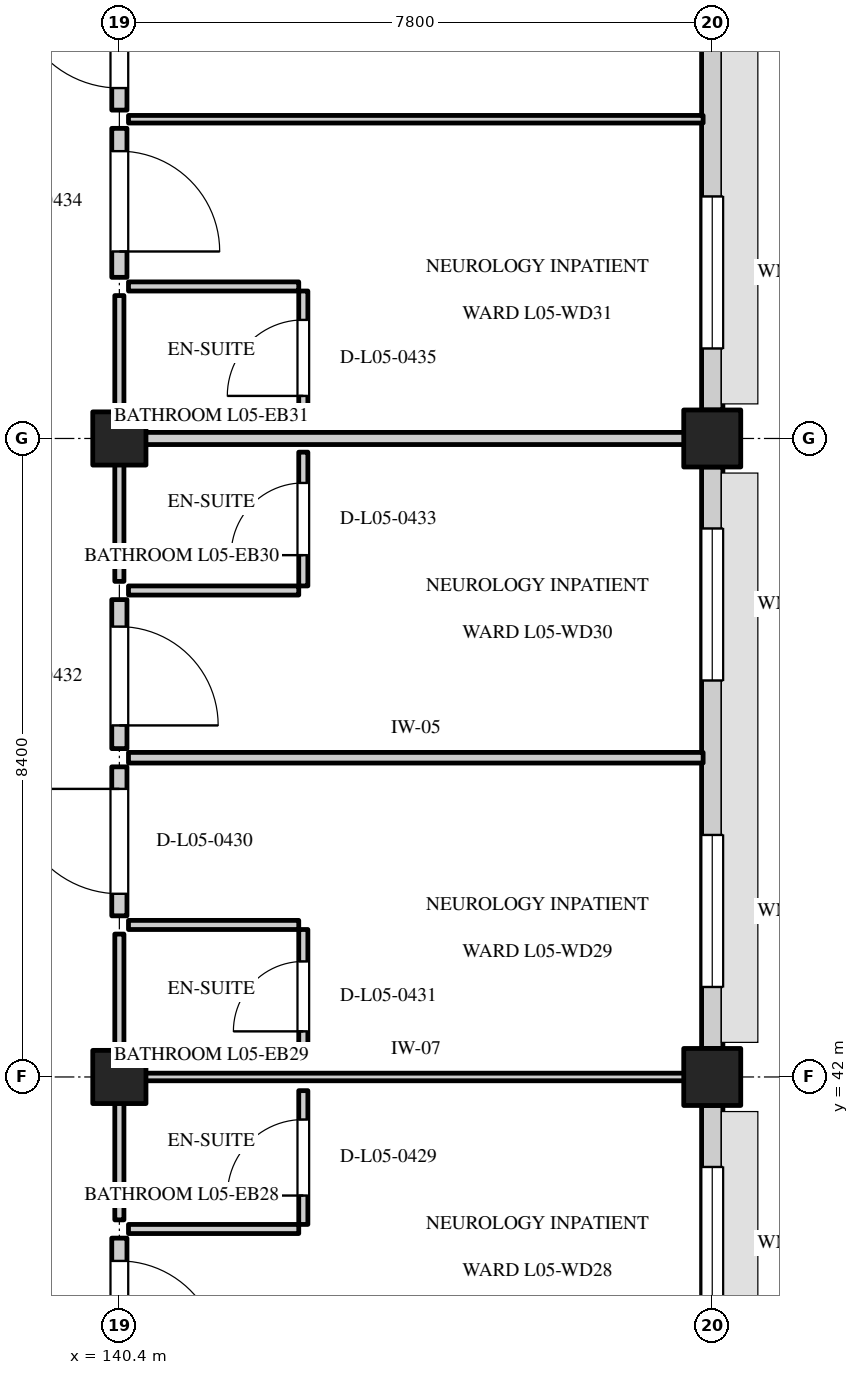
"""IFC4 building model, lengths in metres.
Left out: names, types, materials, properties, quantities, classifications, styles, units other than length and angle.
Written with IfcOpenShell. Run it as: python <this file> out.ifc"""

import sys

from ifc_helpers import new_model, si_unit, direction, frame, frame_2d, origin, origin_2d, place, context, subcontext, project, spatial, rectangle, extrude, element, fill, save


model = new_model("IFC4")
c1 = context("Model", 3, precision=1e-05, world=origin(), true_north=direction((0.0, 1.0)))
c2 = subcontext(c1, "Body", "Model", "MODEL_VIEW")
j1 = project(units=[si_unit("LENGTHUNIT", "METRE"), si_unit("PLANEANGLEUNIT", "RADIAN")], contexts=[c1])
p1 = place(None, origin())
s1 = spatial("IfcSite", under=j1, at=p1, CompositionType="ELEMENT")
p2 = place(p1, origin())
s2 = spatial("IfcBuilding", under=s1, at=p2, CompositionType="ELEMENT")
p3 = place(p2, frame((0.0, 0.0, 22.2)))
s3 = spatial("IfcBuildingStorey", under=s2, at=p3, CompositionType="ELEMENT", Elevation=22.2)
for number, where, z_axis, x_axis in (
    (1, (140.4, 42.0, 0.0), (0.0, 0.0, 1.0), (1.0, 0.0, 0.0)),
    (2, (140.4, 50.4, 0.0), (0.0, 0.0, 1.0), (1.0, 0.0, 0.0)),
):
    element("IfcColumn", number, at=place(p3, frame(where, z_axis=z_axis, x_axis=x_axis)), inside=s3, PredefinedType="COLUMN", context=c2, shape_type="SweptSolid", body=[
        extrude(rectangle(XDim=0.7, YDim=0.7, at=origin_2d()), origin(), (0.0, 0.0, 1.0), 3.9),
    ])
for number, where, z_axis, x_axis in (
    (3, (148.2, 42.0, 0.0), (0.0, 0.0, 1.0), (1.0, 0.0, 0.0)),
    (4, (148.2, 50.4, 0.0), (0.0, 0.0, 1.0), (1.0, 0.0, 0.0)),
):
    element("IfcColumn", number, at=place(p3, frame(where, z_axis=z_axis, x_axis=x_axis)), inside=s3, PredefinedType="COLUMN", context=c2, shape_type="SweptSolid", body=[
        extrude(rectangle(XDim=0.75, YDim=0.75, at=origin_2d()), origin(), (0.0, 0.0, 1.0), 3.9),
    ])
p4 = place(p3, frame((148.2, 33.975, 0.0), z_axis=(0.0, 0.0, 1.0), x_axis=(0.0, 1.0, 0.0)))
e5 = element("IfcWall", 5, at=p4, inside=s3, PredefinedType="STANDARD", context=c2, shape_type="SweptSolid", body=[
    extrude(rectangle(XDim=7.65, YDim=0.28, at=frame_2d((3.825, 0.0))), origin(), (0.0, 0.0, 1.0), 2.95),
])
p5 = place(p4, frame((0.809, 0.0, 0.8)))
e6 = element("IfcOpeningElement", 6, at=p5, cuts=e5, PredefinedType="OPENING", context=c2, shape_type="SweptSolid", body=[
    extrude(rectangle(XDim=2.0, YDim=1.65, at=frame_2d((1.0, 0.825))), frame((0.0, 0.152, 0.0), z_axis=(0.0, -1.0, 0.0), x_axis=(1.0, 0.0, 0.0)), (0.0, 0.0, 1.0), 0.304),
])
p6 = place(p4, frame((4.841, 0.0, 0.8)))
e7 = element("IfcOpeningElement", 7, at=p6, cuts=e5, PredefinedType="OPENING", context=c2, shape_type="SweptSolid", body=[
    extrude(rectangle(XDim=2.0, YDim=1.65, at=frame_2d((1.0, 0.825))), frame((0.0, 0.152, 0.0), z_axis=(0.0, -1.0, 0.0), x_axis=(1.0, 0.0, 0.0)), (0.0, 0.0, 1.0), 0.304),
])
p7 = place(p3, frame((148.2, 42.375, 0.0), z_axis=(0.0, 0.0, 1.0), x_axis=(0.0, 1.0, 0.0)))
e8 = element("IfcWall", 8, at=p7, inside=s3, PredefinedType="STANDARD", context=c2, shape_type="SweptSolid", body=[
    extrude(rectangle(XDim=7.65, YDim=0.28, at=frame_2d((3.825, 0.0))), origin(), (0.0, 0.0, 1.0), 2.95),
])
p8 = place(p7, frame((0.809, 0.0, 0.8)))
e9 = element("IfcOpeningElement", 9, at=p8, cuts=e8, PredefinedType="OPENING", context=c2, shape_type="SweptSolid", body=[
    extrude(rectangle(XDim=2.0, YDim=1.55, at=frame_2d((1.0, 0.775))), frame((0.0, 0.152, 0.0), z_axis=(0.0, -1.0, 0.0), x_axis=(1.0, 0.0, 0.0)), (0.0, 0.0, 1.0), 0.304),
])
p9 = place(p7, frame((4.841, 0.0, 0.8)))
e10 = element("IfcOpeningElement", 10, at=p9, cuts=e8, PredefinedType="OPENING", context=c2, shape_type="SweptSolid", body=[
    extrude(rectangle(XDim=2.0, YDim=1.55, at=frame_2d((1.0, 0.775))), frame((0.0, 0.152, 0.0), z_axis=(0.0, -1.0, 0.0), x_axis=(1.0, 0.0, 0.0)), (0.0, 0.0, 1.0), 0.304),
])
p10 = place(p3, frame((148.2, 50.775, 0.0), z_axis=(0.0, 0.0, 1.0), x_axis=(0.0, 1.0, 0.0)))
e11 = element("IfcWall", 11, at=p10, inside=s3, PredefinedType="STANDARD", context=c2, shape_type="SweptSolid", body=[
    extrude(rectangle(XDim=7.65, YDim=0.28, at=frame_2d((3.825, 0.0))), origin(), (0.0, 0.0, 1.0), 2.95),
])
p11 = place(p10, frame((0.809, 0.0, 0.8)))
e12 = element("IfcOpeningElement", 12, at=p11, cuts=e11, PredefinedType="OPENING", context=c2, shape_type="SweptSolid", body=[
    extrude(rectangle(XDim=2.0, YDim=1.45, at=frame_2d((1.0, 0.725))), frame((0.0, 0.152, 0.0), z_axis=(0.0, -1.0, 0.0), x_axis=(1.0, 0.0, 0.0)), (0.0, 0.0, 1.0), 0.304),
])
p12 = place(p10, frame((4.841, 0.0, 0.8)))
e13 = element("IfcOpeningElement", 13, at=p12, cuts=e11, PredefinedType="OPENING", context=c2, shape_type="SweptSolid", body=[
    extrude(rectangle(XDim=2.0, YDim=1.45, at=frame_2d((1.0, 0.725))), frame((0.0, 0.152, 0.0), z_axis=(0.0, -1.0, 0.0), x_axis=(1.0, 0.0, 0.0)), (0.0, 0.0, 1.0), 0.304),
])
p13 = place(p3, frame((140.52, 42.0, 0.0), z_axis=(0.0, 0.0, 1.0), x_axis=(1.0, 0.0, 0.0)))
e14 = element("IfcWall", 14, at=p13, inside=s3, PredefinedType="PARTITIONING", context=c2, shape_type="SweptSolid", body=[
    extrude(rectangle(XDim=7.56, YDim=0.1, at=frame_2d((3.78, 0.0))), origin(), (0.0, 0.0, 1.0), 3.58),
])
p14 = place(p3, frame((140.4, 37.92, 0.0), z_axis=(0.0, 0.0, 1.0), x_axis=(0.0, 1.0, 0.0)))
e15 = element("IfcWall", 15, at=p14, inside=s3, PredefinedType="STANDARD", context=c2, shape_type="SweptSolid", body=[
    extrude(rectangle(XDim=1.96, YDim=0.2, at=frame_2d((0.98, 0.0))), origin(), (0.0, 0.0, 1.0), 3.58),
])
p15 = place(p14, frame((0.34, 0.0, 0.0)))
e16 = element("IfcOpeningElement", 16, at=p15, cuts=e15, PredefinedType="OPENING", context=c2, shape_type="SweptSolid", body=[
    extrude(rectangle(XDim=1.32, YDim=2.2, at=frame_2d((0.66, 1.1))), frame((0.0, 0.112, 0.0), z_axis=(0.0, -1.0, 0.0), x_axis=(1.0, 0.0, 0.0)), (0.0, 0.0, 1.0), 0.224),
])
p16 = place(p3, frame((140.4, 40.12, 0.0), z_axis=(0.0, 0.0, 1.0), x_axis=(0.0, 1.0, 0.0)))
e17 = element("IfcWall", 17, at=p16, inside=s3, PredefinedType="PARTITIONING", context=c2, shape_type="SweptSolid", body=[
    extrude(rectangle(XDim=1.76, YDim=0.12, at=frame_2d((0.88, 0.0))), origin(), (0.0, 0.0, 1.0), 3.58),
])
p17 = place(p3, frame((140.52, 40.0, 0.0), z_axis=(0.0, 0.0, 1.0), x_axis=(1.0, 0.0, 0.0)))
e18 = element("IfcWall", 18, at=p17, inside=s3, PredefinedType="PARTITIONING", context=c2, shape_type="SweptSolid", body=[
    extrude(rectangle(XDim=2.24, YDim=0.12, at=frame_2d((1.12, 0.0))), origin(), (0.0, 0.0, 1.0), 3.58),
])
p18 = place(p3, frame((142.82, 40.06, 0.0), z_axis=(0.0, 0.0, 1.0), x_axis=(0.0, 1.0, 0.0)))
e19 = element("IfcWall", 19, at=p18, inside=s3, PredefinedType="PARTITIONING", context=c2, shape_type="SweptSolid", body=[
    extrude(rectangle(XDim=1.76, YDim=0.12, at=frame_2d((0.88, 0.0))), origin(), (0.0, 0.0, 1.0), 3.58),
])
p19 = place(p18, frame((0.38, 0.0, 0.0)))
e20 = element("IfcOpeningElement", 20, at=p19, cuts=e19, PredefinedType="OPENING", context=c2, shape_type="SweptSolid", body=[
    extrude(rectangle(XDim=1.0, YDim=2.1, at=frame_2d((0.5, 1.05))), frame((0.0, 0.072, 0.0), z_axis=(0.0, -1.0, 0.0), x_axis=(1.0, 0.0, 0.0)), (0.0, 0.0, 1.0), 0.144),
])
p20 = place(p3, frame((140.52, 46.2, 0.0), z_axis=(0.0, 0.0, 1.0), x_axis=(1.0, 0.0, 0.0)))
e21 = element("IfcWall", 21, at=p20, inside=s3, PredefinedType="PARTITIONING", context=c2, shape_type="SweptSolid", body=[
    extrude(rectangle(XDim=7.56, YDim=0.14, at=frame_2d((3.78, 0.0))), origin(), (0.0, 0.0, 1.0), 3.58),
])
p21 = place(p3, frame((140.4, 44.12, 0.0), z_axis=(0.0, 0.0, 1.0), x_axis=(0.0, 1.0, 0.0)))
e22 = element("IfcWall", 22, at=p21, inside=s3, PredefinedType="STANDARD", context=c2, shape_type="SweptSolid", body=[
    extrude(rectangle(XDim=1.96, YDim=0.2, at=frame_2d((0.98, 0.0))), origin(), (0.0, 0.0, 1.0), 3.58),
])
p22 = place(p21, frame((0.29, 0.0, 0.0)))
e23 = element("IfcOpeningElement", 23, at=p22, cuts=e22, PredefinedType="OPENING", context=c2, shape_type="SweptSolid", body=[
    extrude(rectangle(XDim=1.38, YDim=2.2, at=frame_2d((0.69, 1.1))), frame((0.0, 0.112, 0.0), z_axis=(0.0, -1.0, 0.0), x_axis=(1.0, 0.0, 0.0)), (0.0, 0.0, 1.0), 0.224),
])
p23 = place(p3, frame((140.4, 42.12, 0.0), z_axis=(0.0, 0.0, 1.0), x_axis=(0.0, 1.0, 0.0)))
e24 = element("IfcWall", 24, at=p23, inside=s3, PredefinedType="PARTITIONING", context=c2, shape_type="SweptSolid", body=[
    extrude(rectangle(XDim=1.76, YDim=0.12, at=frame_2d((0.88, 0.0))), origin(), (0.0, 0.0, 1.0), 3.58),
])
p24 = place(p3, frame((140.52, 44.0, 0.0), z_axis=(0.0, 0.0, 1.0), x_axis=(1.0, 0.0, 0.0)))
e25 = element("IfcWall", 25, at=p24, inside=s3, PredefinedType="PARTITIONING", context=c2, shape_type="SweptSolid", body=[
    extrude(rectangle(XDim=2.24, YDim=0.12, at=frame_2d((1.12, 0.0))), origin(), (0.0, 0.0, 1.0), 3.58),
])
p25 = place(p3, frame((142.82, 42.18, 0.0), z_axis=(0.0, 0.0, 1.0), x_axis=(0.0, 1.0, 0.0)))
e26 = element("IfcWall", 26, at=p25, inside=s3, PredefinedType="PARTITIONING", context=c2, shape_type="SweptSolid", body=[
    extrude(rectangle(XDim=1.76, YDim=0.12, at=frame_2d((0.88, 0.0))), origin(), (0.0, 0.0, 1.0), 3.58),
])
p26 = place(p25, frame((0.42, 0.0, 0.0)))
e27 = element("IfcOpeningElement", 27, at=p26, cuts=e26, PredefinedType="OPENING", context=c2, shape_type="SweptSolid", body=[
    extrude(rectangle(XDim=0.92, YDim=2.08, at=frame_2d((0.46, 1.04))), frame((0.0, 0.072, 0.0), z_axis=(0.0, -1.0, 0.0), x_axis=(1.0, 0.0, 0.0)), (0.0, 0.0, 1.0), 0.144),
])
p27 = place(p3, frame((140.52, 50.4, 0.0), z_axis=(0.0, 0.0, 1.0), x_axis=(1.0, 0.0, 0.0)))
e28 = element("IfcWall", 28, at=p27, inside=s3, PredefinedType="PARTITIONING", context=c2, shape_type="SweptSolid", body=[
    extrude(rectangle(XDim=7.56, YDim=0.16, at=frame_2d((3.78, 0.0))), origin(), (0.0, 0.0, 1.0), 2.95),
])
p28 = place(p3, frame((140.4, 46.32, 0.0), z_axis=(0.0, 0.0, 1.0), x_axis=(0.0, 1.0, 0.0)))
e29 = element("IfcWall", 29, at=p28, inside=s3, PredefinedType="STANDARD", context=c2, shape_type="SweptSolid", body=[
    extrude(rectangle(XDim=1.96, YDim=0.2, at=frame_2d((0.98, 0.0))), origin(), (0.0, 0.0, 1.0), 3.58),
])
p29 = place(p28, frame((0.305, 0.0, 0.0)))
e30 = element("IfcOpeningElement", 30, at=p29, cuts=e29, PredefinedType="OPENING", context=c2, shape_type="SweptSolid", body=[
    extrude(rectangle(XDim=1.3, YDim=2.15, at=frame_2d((0.65, 1.075))), frame((0.0, 0.112, 0.0), z_axis=(0.0, -1.0, 0.0), x_axis=(1.0, 0.0, 0.0)), (0.0, 0.0, 1.0), 0.224),
])
p30 = place(p3, frame((140.4, 48.52, 0.0), z_axis=(0.0, 0.0, 1.0), x_axis=(0.0, 1.0, 0.0)))
e31 = element("IfcWall", 31, at=p30, inside=s3, PredefinedType="PARTITIONING", context=c2, shape_type="SweptSolid", body=[
    extrude(rectangle(XDim=1.76, YDim=0.12, at=frame_2d((0.88, 0.0))), origin(), (0.0, 0.0, 1.0), 3.58),
])
p31 = place(p3, frame((140.52, 48.4, 0.0), z_axis=(0.0, 0.0, 1.0), x_axis=(1.0, 0.0, 0.0)))
e32 = element("IfcWall", 32, at=p31, inside=s3, PredefinedType="PARTITIONING", context=c2, shape_type="SweptSolid", body=[
    extrude(rectangle(XDim=2.24, YDim=0.12, at=frame_2d((1.12, 0.0))), origin(), (0.0, 0.0, 1.0), 3.58),
])
p32 = place(p3, frame((142.82, 48.46, 0.0), z_axis=(0.0, 0.0, 1.0), x_axis=(0.0, 1.0, 0.0)))
e33 = element("IfcWall", 33, at=p32, inside=s3, PredefinedType="PARTITIONING", context=c2, shape_type="SweptSolid", body=[
    extrude(rectangle(XDim=1.76, YDim=0.12, at=frame_2d((0.88, 0.0))), origin(), (0.0, 0.0, 1.0), 3.58),
])
p33 = place(p32, frame((0.405, 0.0, 0.0)))
e34 = element("IfcOpeningElement", 34, at=p33, cuts=e33, PredefinedType="OPENING", context=c2, shape_type="SweptSolid", body=[
    extrude(rectangle(XDim=0.95, YDim=2.1, at=frame_2d((0.475, 1.05))), frame((0.0, 0.072, 0.0), z_axis=(0.0, -1.0, 0.0), x_axis=(1.0, 0.0, 0.0)), (0.0, 0.0, 1.0), 0.144),
])
p34 = place(p3, frame((140.52, 54.6, 0.0), z_axis=(0.0, 0.0, 1.0), x_axis=(1.0, 0.0, 0.0)))
e35 = element("IfcWall", 35, at=p34, inside=s3, PredefinedType="PARTITIONING", context=c2, shape_type="SweptSolid", body=[
    extrude(rectangle(XDim=7.56, YDim=0.1, at=frame_2d((3.78, 0.0))), origin(), (0.0, 0.0, 1.0), 3.58),
])
p35 = place(p3, frame((140.4, 52.52, 0.0), z_axis=(0.0, 0.0, 1.0), x_axis=(0.0, 1.0, 0.0)))
e36 = element("IfcWall", 36, at=p35, inside=s3, PredefinedType="STANDARD", context=c2, shape_type="SweptSolid", body=[
    extrude(rectangle(XDim=1.96, YDim=0.2, at=frame_2d((0.98, 0.0))), origin(), (0.0, 0.0, 1.0), 3.58),
])
p36 = place(p35, frame((0.34, 0.0, 0.0)))
e37 = element("IfcOpeningElement", 37, at=p36, cuts=e36, PredefinedType="OPENING", context=c2, shape_type="SweptSolid", body=[
    extrude(rectangle(XDim=1.32, YDim=2.2, at=frame_2d((0.66, 1.1))), frame((0.0, 0.112, 0.0), z_axis=(0.0, -1.0, 0.0), x_axis=(1.0, 0.0, 0.0)), (0.0, 0.0, 1.0), 0.224),
])
p37 = place(p3, frame((140.4, 50.52, 0.0), z_axis=(0.0, 0.0, 1.0), x_axis=(0.0, 1.0, 0.0)))
e38 = element("IfcWall", 38, at=p37, inside=s3, PredefinedType="PARTITIONING", context=c2, shape_type="SweptSolid", body=[
    extrude(rectangle(XDim=1.76, YDim=0.12, at=frame_2d((0.88, 0.0))), origin(), (0.0, 0.0, 1.0), 3.58),
])
p38 = place(p3, frame((140.52, 52.4, 0.0), z_axis=(0.0, 0.0, 1.0), x_axis=(1.0, 0.0, 0.0)))
e39 = element("IfcWall", 39, at=p38, inside=s3, PredefinedType="PARTITIONING", context=c2, shape_type="SweptSolid", body=[
    extrude(rectangle(XDim=2.24, YDim=0.12, at=frame_2d((1.12, 0.0))), origin(), (0.0, 0.0, 1.0), 3.58),
])
p39 = place(p3, frame((142.82, 50.58, 0.0), z_axis=(0.0, 0.0, 1.0), x_axis=(0.0, 1.0, 0.0)))
e40 = element("IfcWall", 40, at=p39, inside=s3, PredefinedType="PARTITIONING", context=c2, shape_type="SweptSolid", body=[
    extrude(rectangle(XDim=1.76, YDim=0.12, at=frame_2d((0.88, 0.0))), origin(), (0.0, 0.0, 1.0), 3.58),
])
p40 = place(p39, frame((0.38, 0.0, 0.0)))
e41 = element("IfcOpeningElement", 41, at=p40, cuts=e40, PredefinedType="OPENING", context=c2, shape_type="SweptSolid", body=[
    extrude(rectangle(XDim=1.0, YDim=2.1, at=frame_2d((0.5, 1.05))), frame((0.0, 0.072, 0.0), z_axis=(0.0, -1.0, 0.0), x_axis=(1.0, 0.0, 0.0)), (0.0, 0.0, 1.0), 0.144),
])
p41 = place(p3, frame((140.4, 54.72, 0.0), z_axis=(0.0, 0.0, 1.0), x_axis=(0.0, 1.0, 0.0)))
e42 = element("IfcWall", 42, at=p41, inside=s3, PredefinedType="STANDARD", context=c2, shape_type="SweptSolid", body=[
    extrude(rectangle(XDim=1.96, YDim=0.2, at=frame_2d((0.98, 0.0))), origin(), (0.0, 0.0, 1.0), 3.58),
])
p42 = place(p41, frame((0.29, 0.0, 0.0)))
e43 = element("IfcOpeningElement", 43, at=p42, cuts=e42, PredefinedType="OPENING", context=c2, shape_type="SweptSolid", body=[
    extrude(rectangle(XDim=1.38, YDim=2.2, at=frame_2d((0.69, 1.1))), frame((0.0, 0.112, 0.0), z_axis=(0.0, -1.0, 0.0), x_axis=(1.0, 0.0, 0.0)), (0.0, 0.0, 1.0), 0.224),
])
p43 = place(p6, origin())
e44 = element("IfcWindow", 44, at=p43, inside=s3, PartitioningType="DOUBLE_PANEL_VERTICAL", PredefinedType="WINDOW", context=c2, shape_type="SweptSolid", body=[
    extrude(rectangle(XDim=2.0, YDim=1.65, at=frame_2d((1.0, 0.825))), frame((0.0, 0.03, 0.0), z_axis=(0.0, -1.0, 0.0), x_axis=(1.0, 0.0, 0.0)), (0.0, 0.0, 1.0), 0.06),
])
fill(e7, e44)
p44 = place(p8, origin())
e45 = element("IfcWindow", 45, at=p44, inside=s3, PartitioningType="DOUBLE_PANEL_VERTICAL", PredefinedType="WINDOW", context=c2, shape_type="SweptSolid", body=[
    extrude(rectangle(XDim=2.0, YDim=1.55, at=frame_2d((1.0, 0.775))), frame((0.0, 0.03, 0.0), z_axis=(0.0, -1.0, 0.0), x_axis=(1.0, 0.0, 0.0)), (0.0, 0.0, 1.0), 0.06),
])
fill(e9, e45)
p45 = place(p9, origin())
e46 = element("IfcWindow", 46, at=p45, inside=s3, PartitioningType="DOUBLE_PANEL_VERTICAL", PredefinedType="WINDOW", context=c2, shape_type="SweptSolid", body=[
    extrude(rectangle(XDim=2.0, YDim=1.55, at=frame_2d((1.0, 0.775))), frame((0.0, 0.03, 0.0), z_axis=(0.0, -1.0, 0.0), x_axis=(1.0, 0.0, 0.0)), (0.0, 0.0, 1.0), 0.06),
])
fill(e10, e46)
p46 = place(p11, origin())
e47 = element("IfcWindow", 47, at=p46, inside=s3, PartitioningType="DOUBLE_PANEL_VERTICAL", PredefinedType="WINDOW", context=c2, shape_type="SweptSolid", body=[
    extrude(rectangle(XDim=2.0, YDim=1.45, at=frame_2d((1.0, 0.725))), frame((0.0, 0.03, 0.0), z_axis=(0.0, -1.0, 0.0), x_axis=(1.0, 0.0, 0.0)), (0.0, 0.0, 1.0), 0.06),
])
fill(e12, e47)
p47 = place(p15, frame((1.32, 0.0, 0.0), z_axis=(0.0, 0.0, 1.0), x_axis=(-1.0, 0.0, 0.0)))
e48 = element("IfcDoor", 48, at=p47, inside=s3, OperationType="SINGLE_SWING_RIGHT", PredefinedType="DOOR", context=c2, shape_type="SweptSolid", body=[
    extrude(rectangle(XDim=1.32, YDim=2.2, at=frame_2d((0.66, 1.1))), frame((0.0, 0.025, 0.0), z_axis=(0.0, -1.0, 0.0), x_axis=(1.0, 0.0, 0.0)), (0.0, 0.0, 1.0), 0.05),
])
fill(e16, e48)
p48 = place(p19, origin())
e49 = element("IfcDoor", 49, at=p48, inside=s3, OperationType="SINGLE_SWING_LEFT", PredefinedType="DOOR", context=c2, shape_type="SweptSolid", body=[
    extrude(rectangle(XDim=1.0, YDim=2.1, at=frame_2d((0.5, 1.05))), frame((0.0, 0.025, 0.0), z_axis=(0.0, -1.0, 0.0), x_axis=(1.0, 0.0, 0.0)), (0.0, 0.0, 1.0), 0.05),
])
fill(e20, e49)
p49 = place(p22, frame((1.38, 0.0, 0.0), z_axis=(0.0, 0.0, 1.0), x_axis=(-1.0, 0.0, 0.0)))
e50 = element("IfcDoor", 50, at=p49, inside=s3, OperationType="SINGLE_SWING_LEFT", PredefinedType="DOOR", context=c2, shape_type="SweptSolid", body=[
    extrude(rectangle(XDim=1.38, YDim=2.2, at=frame_2d((0.69, 1.1))), frame((0.0, 0.025, 0.0), z_axis=(0.0, -1.0, 0.0), x_axis=(1.0, 0.0, 0.0)), (0.0, 0.0, 1.0), 0.05),
])
fill(e23, e50)
p50 = place(p26, origin())
e51 = element("IfcDoor", 51, at=p50, inside=s3, OperationType="SINGLE_SWING_LEFT", PredefinedType="DOOR", context=c2, shape_type="SweptSolid", body=[
    extrude(rectangle(XDim=0.92, YDim=2.08, at=frame_2d((0.46, 1.04))), frame((0.0, 0.025, 0.0), z_axis=(0.0, -1.0, 0.0), x_axis=(1.0, 0.0, 0.0)), (0.0, 0.0, 1.0), 0.05),
])
fill(e27, e51)
p51 = place(p29, frame((1.3, 0.0, 0.0), z_axis=(0.0, 0.0, 1.0), x_axis=(-1.0, 0.0, 0.0)))
e52 = element("IfcDoor", 52, at=p51, inside=s3, OperationType="SINGLE_SWING_RIGHT", PredefinedType="DOOR", context=c2, shape_type="SweptSolid", body=[
    extrude(rectangle(XDim=1.3, YDim=2.15, at=frame_2d((0.65, 1.075))), frame((0.0, 0.025, 0.0), z_axis=(0.0, -1.0, 0.0), x_axis=(1.0, 0.0, 0.0)), (0.0, 0.0, 1.0), 0.05),
])
fill(e30, e52)
p52 = place(p33, origin())
e53 = element("IfcDoor", 53, at=p52, inside=s3, OperationType="SINGLE_SWING_LEFT", PredefinedType="DOOR", context=c2, shape_type="SweptSolid", body=[
    extrude(rectangle(XDim=0.95, YDim=2.1, at=frame_2d((0.475, 1.05))), frame((0.0, 0.025, 0.0), z_axis=(0.0, -1.0, 0.0), x_axis=(1.0, 0.0, 0.0)), (0.0, 0.0, 1.0), 0.05),
])
fill(e34, e53)
p53 = place(p36, frame((1.32, 0.0, 0.0), z_axis=(0.0, 0.0, 1.0), x_axis=(-1.0, 0.0, 0.0)))
e54 = element("IfcDoor", 54, at=p53, inside=s3, OperationType="SINGLE_SWING_RIGHT", PredefinedType="DOOR", context=c2, shape_type="SweptSolid", body=[
    extrude(rectangle(XDim=1.32, YDim=2.2, at=frame_2d((0.66, 1.1))), frame((0.0, 0.025, 0.0), z_axis=(0.0, -1.0, 0.0), x_axis=(1.0, 0.0, 0.0)), (0.0, 0.0, 1.0), 0.05),
])
fill(e37, e54)
p54 = place(p40, origin())
e55 = element("IfcDoor", 55, at=p54, inside=s3, OperationType="SINGLE_SWING_LEFT", PredefinedType="DOOR", context=c2, shape_type="SweptSolid", body=[
    extrude(rectangle(XDim=1.0, YDim=2.1, at=frame_2d((0.5, 1.05))), frame((0.0, 0.025, 0.0), z_axis=(0.0, -1.0, 0.0), x_axis=(1.0, 0.0, 0.0)), (0.0, 0.0, 1.0), 0.05),
])
fill(e41, e55)
p55 = place(p42, frame((1.38, 0.0, 0.0), z_axis=(0.0, 0.0, 1.0), x_axis=(-1.0, 0.0, 0.0)))
e56 = element("IfcDoor", 56, at=p55, inside=s3, OperationType="SINGLE_SWING_LEFT", PredefinedType="DOOR", context=c2, shape_type="SweptSolid", body=[
    extrude(rectangle(XDim=1.38, YDim=2.2, at=frame_2d((0.69, 1.1))), frame((0.0, 0.025, 0.0), z_axis=(0.0, -1.0, 0.0), x_axis=(1.0, 0.0, 0.0)), (0.0, 0.0, 1.0), 0.05),
])
fill(e43, e56)
save(model, sys.argv[1])
